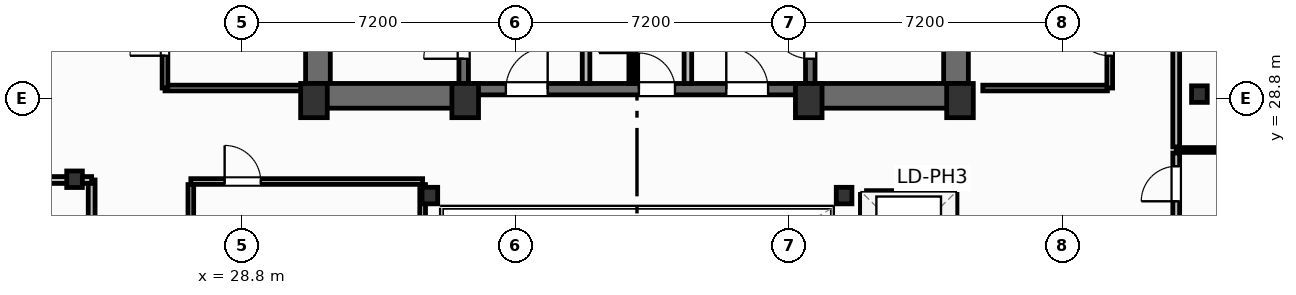
"""IFC4 building model, lengths in metres.
Left out: names, types, materials, properties, quantities, classifications, styles, units other than length and angle.
Written with IfcOpenShell. Run it as: python <this file> out.ifc"""

import sys

from ifc_helpers import new_model, si_unit, direction, frame, frame_2d, origin, origin_2d, place, context, subcontext, project, spatial, rectangle, i_section, extrude, element, fill, save


model = new_model("IFC4")
c1 = context("Model", 3, precision=1e-05, world=origin(), true_north=direction((0.0, 1.0)))
c2 = subcontext(c1, "Body", "Model", "MODEL_VIEW")
j1 = project(units=[si_unit("LENGTHUNIT", "METRE"), si_unit("PLANEANGLEUNIT", "RADIAN")], contexts=[c1])
p1 = place(None, origin())
s1 = spatial("IfcSite", under=j1, at=p1, CompositionType="ELEMENT")
p2 = place(p1, origin())
s2 = spatial("IfcBuilding", under=s1, at=p2, CompositionType="ELEMENT")
p3 = place(p2, frame((0.0, 0.0, 223.8)))
s3 = spatial("IfcBuildingStorey", under=s2, at=p3, CompositionType="ELEMENT", Elevation=223.8)
for number, where, z_axis, x_axis in (
    (1, (30.7, 28.75, 0.0), (0.0, 0.0, 1.0), (1.0, 0.0, 0.0)),
    (2, (34.68, 28.75, 0.0), (0.0, 0.0, 1.0), (1.0, 0.0, 0.0)),
    (3, (43.72, 28.75, 0.0), (0.0, 0.0, 1.0), (1.0, 0.0, 0.0)),
    (4, (47.7, 28.75, 0.0), (0.0, 0.0, 1.0), (1.0, 0.0, 0.0)),
):
    element("IfcColumn", number, at=place(p3, frame(where, z_axis=z_axis, x_axis=x_axis)), inside=s3, PredefinedType="COLUMN", context=c2, shape_type="SweptSolid", body=[
        extrude(rectangle(XDim=0.7, YDim=0.9, at=origin_2d()), origin(), (0.0, 0.0, 1.0), 3.7),
    ])
for number, where, z_axis, x_axis in (
    (5, (33.75, 26.25, 0.0), (0.0, 0.0, 1.0), (1.0, 0.0, 0.0)),
    (6, (44.65, 26.25, 0.0), (0.0, 0.0, 1.0), (1.0, 0.0, 0.0)),
    (7, (24.4, 26.68, 0.0), (0.0, 0.0, 1.0), (1.0, 0.0, 0.0)),
    (8, (54.0, 28.92, 0.0), (0.0, 0.0, 1.0), (1.0, 0.0, 0.0)),
):
    element("IfcColumn", number, at=place(p3, frame(where, z_axis=z_axis, x_axis=x_axis)), inside=s3, PredefinedType="COLUMN", context=c2, shape_type="SweptSolid", body=[
        extrude(i_section(OverallWidth=0.412, OverallDepth=0.435, WebThickness=0.036, FlangeThickness=0.057, FilletRadius=0.025, at=origin_2d()), origin(), (0.0, 0.0, 1.0), 3.7),
    ])
for number, where, z_axis, x_axis in (
    (9, (30.805, 29.2, 0.0), (0.0, 0.0, 1.0), (0.0, 1.0, 0.0)),
    (10, (47.595, 29.2, 0.0), (0.0, 0.0, 1.0), (0.0, 1.0, 0.0)),
):
    element("IfcWall", number, at=place(p3, frame(where, z_axis=z_axis, x_axis=x_axis)), inside=s3, PredefinedType="SHEAR", context=c2, shape_type="SweptSolid", body=[
        extrude(rectangle(XDim=9.22, YDim=0.65, at=frame_2d((4.61, 0.0))), origin(), (0.0, 0.0, 1.0), 3.45),
    ])
p4 = place(p3, frame((30.48, 28.875, 0.0), z_axis=(0.0, 0.0, 1.0), x_axis=(1.0, 0.0, 0.0)))
e11 = element("IfcWall", 11, at=p4, inside=s3, PredefinedType="SHEAR", context=c2, shape_type="SweptSolid", body=[
    extrude(rectangle(XDim=4.32, YDim=0.65, at=frame_2d((2.16, 0.0))), origin(), (0.0, 0.0, 1.0), 3.45),
])
p5 = place(p3, frame((43.6, 28.875, 0.0), z_axis=(0.0, 0.0, 1.0), x_axis=(1.0, 0.0, 0.0)))
e12 = element("IfcWall", 12, at=p5, inside=s3, PredefinedType="SHEAR", context=c2, shape_type="SweptSolid", body=[
    extrude(rectangle(XDim=4.32, YDim=0.65, at=frame_2d((2.16, 0.0))), origin(), (0.0, 0.0, 1.0), 3.45),
])
p6 = place(p3, frame((34.8, 29.05, 0.0), z_axis=(0.0, 0.0, 1.0), x_axis=(1.0, 0.0, 0.0)))
e13 = element("IfcWall", 13, at=p6, inside=s3, PredefinedType="SHEAR", context=c2, shape_type="SweptSolid", body=[
    extrude(rectangle(XDim=8.8, YDim=0.3, at=frame_2d((4.4, 0.0))), origin(), (0.0, 0.0, 1.0), 3.45),
])
p7 = place(p6, frame((0.95, 0.0, 0.0)))
e14 = element("IfcOpeningElement", 14, at=p7, cuts=e13, PredefinedType="OPENING", context=c2, shape_type="SweptSolid", body=[
    extrude(rectangle(XDim=1.1, YDim=2.15, at=frame_2d((0.55, 1.075))), frame((0.0, 0.16, 0.0), z_axis=(0.0, -1.0, 0.0), x_axis=(1.0, 0.0, 0.0)), (0.0, 0.0, 1.0), 0.32),
])
p8 = place(p6, frame((6.75, 0.0, 0.0)))
e15 = element("IfcOpeningElement", 15, at=p8, cuts=e13, PredefinedType="OPENING", context=c2, shape_type="SweptSolid", body=[
    extrude(rectangle(XDim=1.1, YDim=2.15, at=frame_2d((0.55, 1.075))), frame((0.0, 0.16, 0.0), z_axis=(0.0, -1.0, 0.0), x_axis=(1.0, 0.0, 0.0)), (0.0, 0.0, 1.0), 0.32),
])
p9 = place(p6, frame((4.45, 0.0, 0.0)))
e16 = element("IfcOpeningElement", 16, at=p9, cuts=e13, PredefinedType="OPENING", context=c2, shape_type="SweptSolid", body=[
    extrude(rectangle(XDim=0.95, YDim=2.15, at=frame_2d((0.475, 1.075))), frame((0.0, 0.16, 0.0), z_axis=(0.0, -1.0, 0.0), x_axis=(1.0, 0.0, 0.0)), (0.0, 0.0, 1.0), 0.32),
])
p10 = place(p3, frame((34.64, 29.2, 0.0), z_axis=(0.0, 0.0, 1.0), x_axis=(0.0, 1.0, 0.0)))
e17 = element("IfcWall", 17, at=p10, inside=s3, PredefinedType="SHEAR", context=c2, shape_type="SweptSolid", body=[
    extrude(rectangle(XDim=9.22, YDim=0.25, at=frame_2d((4.61, 0.0))), origin(), (0.0, 0.0, 1.0), 3.45),
])
p11 = place(p10, frame((0.65, 0.0, 0.0)))
e18 = element("IfcOpeningElement", 18, at=p11, cuts=e17, PredefinedType="OPENING", context=c2, shape_type="SweptSolid", body=[
    extrude(rectangle(XDim=1.05, YDim=2.15, at=frame_2d((0.525, 1.075))), frame((0.0, 0.135, 0.0), z_axis=(0.0, -1.0, 0.0), x_axis=(1.0, 0.0, 0.0)), (0.0, 0.0, 1.0), 0.27),
])
p12 = place(p3, frame((43.76, 29.2, 0.0), z_axis=(0.0, 0.0, 1.0), x_axis=(0.0, 1.0, 0.0)))
e19 = element("IfcWall", 19, at=p12, inside=s3, PredefinedType="SHEAR", context=c2, shape_type="SweptSolid", body=[
    extrude(rectangle(XDim=9.22, YDim=0.25, at=frame_2d((4.61, 0.0))), origin(), (0.0, 0.0, 1.0), 3.45),
])
p13 = place(p12, frame((0.65, 0.0, 0.0)))
e20 = element("IfcOpeningElement", 20, at=p13, cuts=e19, PredefinedType="OPENING", context=c2, shape_type="SweptSolid", body=[
    extrude(rectangle(XDim=1.05, YDim=2.15, at=frame_2d((0.525, 1.075))), frame((0.0, 0.135, 0.0), z_axis=(0.0, -1.0, 0.0), x_axis=(1.0, 0.0, 0.0)), (0.0, 0.0, 1.0), 0.27),
])
p14 = place(p3, frame((24.85, 19.24, 0.0), z_axis=(0.0, 0.0, 1.0), x_axis=(0.0, 1.0, 0.0)))
e21 = element("IfcWall", 21, at=p14, inside=s3, PredefinedType="PARTITIONING", context=c2, shape_type="SweptSolid", body=[
    extrude(rectangle(XDim=7.42, YDim=0.18, at=frame_2d((3.71, 0.0))), origin(), (0.0, 0.0, 1.0), 3.45),
])
p15 = place(p14, frame((2.4, 0.0, 0.0)))
e22 = element("IfcOpeningElement", 22, at=p15, cuts=e21, PredefinedType="OPENING", context=c2, shape_type="SweptSolid", body=[
    extrude(rectangle(XDim=0.92, YDim=2.05, at=frame_2d((0.46, 1.025))), frame((0.0, 0.1, 0.0), z_axis=(0.0, -1.0, 0.0), x_axis=(1.0, 0.0, 0.0)), (0.0, 0.0, 1.0), 0.2),
])
p16 = place(p3, frame((3.482, 26.66, 0.0), z_axis=(0.0, 0.0, 1.0), x_axis=(1.0, 0.0, 0.0)))
e23 = element("IfcWall", 23, at=p16, inside=s3, PredefinedType="PARTITIONING", context=c2, shape_type="SweptSolid", body=[
    extrude(rectangle(XDim=21.368, YDim=0.18, at=frame_2d((10.684, 0.0))), origin(), (0.0, 0.0, 1.0), 2.662),
])
p17 = place(p3, frame((53.39, 19.3, 0.0), z_axis=(0.0, 0.0, 1.0), x_axis=(0.0, 1.0, 0.0)))
e24 = element("IfcWall", 24, at=p17, inside=s3, PredefinedType="PARTITIONING", context=c2, shape_type="SweptSolid", body=[
    extrude(rectangle(XDim=8.07, YDim=0.18, at=frame_2d((4.035, 0.0))), origin(), (0.0, 0.0, 1.0), 3.45),
])
p18 = place(p17, frame((6.8, 0.0, 0.0)))
e25 = element("IfcOpeningElement", 25, at=p18, cuts=e24, PredefinedType="OPENING", context=c2, shape_type="SweptSolid", body=[
    extrude(rectangle(XDim=0.92, YDim=2.05, at=frame_2d((0.46, 1.025))), frame((0.0, 0.1, 0.0), z_axis=(0.0, -1.0, 0.0), x_axis=(1.0, 0.0, 0.0)), (0.0, 0.0, 1.0), 0.2),
])
p19 = place(p3, frame((53.39, 27.53, 0.0), z_axis=(0.0, 0.0, 1.0), x_axis=(0.0, 1.0, 0.0)))
e26 = element("IfcWall", 26, at=p19, inside=s3, PredefinedType="PARTITIONING", context=c2, shape_type="SweptSolid", body=[
    extrude(rectangle(XDim=11.67, YDim=0.18, at=frame_2d((5.835, 0.0))), origin(), (0.0, 0.0, 1.0), 3.45),
])
p20 = place(p19, frame((5.8, 0.0, 0.0)))
e27 = element("IfcOpeningElement", 27, at=p20, cuts=e26, PredefinedType="OPENING", context=c2, shape_type="SweptSolid", body=[
    extrude(rectangle(XDim=0.92, YDim=2.05, at=frame_2d((0.46, 1.025))), frame((0.0, 0.1, 0.0), z_axis=(0.0, -1.0, 0.0), x_axis=(1.0, 0.0, 0.0)), (0.0, 0.0, 1.0), 0.2),
])
p21 = place(p3, frame((53.39, 27.45, 0.0), z_axis=(0.0, 0.0, 1.0), x_axis=(1.0, 0.0, 0.0)))
e28 = element("IfcWall", 28, at=p21, inside=s3, PredefinedType="PARTITIONING", context=c2, shape_type="SweptSolid", body=[
    extrude(rectangle(XDim=20.199, YDim=0.125, at=frame_2d((10.1, 0.0))), origin(), (0.0, 0.0, 1.0), 2.739),
])
for number, where, z_axis, x_axis in (
    (29, (37.86, 29.2, 0.0), (0.0, 0.0, 1.0), (0.0, 1.0, 0.0)),
    (30, (40.54, 29.2, 0.0), (0.0, 0.0, 1.0), (0.0, 1.0, 0.0)),
):
    element("IfcWall", number, at=place(p3, frame(where, z_axis=z_axis, x_axis=x_axis)), inside=s3, PredefinedType="PARTITIONING", context=c2, shape_type="SweptSolid", body=[
        extrude(rectangle(XDim=5.18, YDim=0.2, at=frame_2d((2.59, 0.0))), origin(), (0.0, 0.0, 1.0), 3.45),
    ])
p22 = place(p3, frame((39.05, 29.2, 0.0), z_axis=(0.0, 0.0, 1.0), x_axis=(0.0, 1.0, 0.0)))
e31 = element("IfcWall", 31, at=p22, inside=s3, PredefinedType="PARTITIONING", context=c2, shape_type="SweptSolid", body=[
    extrude(rectangle(XDim=5.22, YDim=0.125, at=frame_2d((2.61, 0.0))), origin(), (0.0, 0.0, 1.0), 3.45),
])
p23 = place(p22, frame((0.8, 0.0, 0.0)))
e32 = element("IfcOpeningElement", 32, at=p23, cuts=e31, PredefinedType="OPENING", context=c2, shape_type="SweptSolid", body=[
    extrude(rectangle(XDim=0.85, YDim=2.05, at=frame_2d((0.425, 1.025))), frame((0.0, 0.073, 0.0), z_axis=(0.0, -1.0, 0.0), x_axis=(1.0, 0.0, 0.0)), (0.0, 0.0, 1.0), 0.145),
])
p24 = place(p22, frame((3.4, 0.0, 0.0)))
e33 = element("IfcOpeningElement", 33, at=p24, cuts=e31, PredefinedType="OPENING", context=c2, shape_type="SweptSolid", body=[
    extrude(rectangle(XDim=0.85, YDim=2.05, at=frame_2d((0.425, 1.025))), frame((0.0, 0.073, 0.0), z_axis=(0.0, -1.0, 0.0), x_axis=(1.0, 0.0, 0.0)), (0.0, 0.0, 1.0), 0.145),
])
p25 = place(p3, frame((27.46, 26.62, 0.0), z_axis=(0.0, 0.0, 1.0), x_axis=(1.0, 0.0, 0.0)))
e34 = element("IfcWall", 34, at=p25, inside=s3, PredefinedType="PARTITIONING", context=c2, shape_type="SweptSolid", body=[
    extrude(rectangle(XDim=6.1, YDim=0.15, at=frame_2d((3.05, 0.0))), origin(), (0.0, 0.0, 1.0), 2.662),
])
p26 = place(p25, frame((0.89, 0.0, 0.0)))
e35 = element("IfcOpeningElement", 35, at=p26, cuts=e34, PredefinedType="OPENING", context=c2, shape_type="SweptSolid", body=[
    extrude(rectangle(XDim=0.95, YDim=2.05, at=frame_2d((0.475, 1.025))), frame((0.0, 0.085, 0.0), z_axis=(0.0, -1.0, 0.0), x_axis=(1.0, 0.0, 0.0)), (0.0, 0.0, 1.0), 0.17),
])
p27 = place(p3, frame((27.46, 19.38, 0.0), z_axis=(0.0, 0.0, 1.0), x_axis=(0.0, 1.0, 0.0)))
e36 = element("IfcWall", 36, at=p27, inside=s3, PredefinedType="PARTITIONING", context=c2, shape_type="SweptSolid", body=[
    extrude(rectangle(XDim=7.16, YDim=0.15, at=frame_2d((3.58, 0.0))), origin(), (0.0, 0.0, 1.0), 3.45),
])
p28 = place(p27, frame((1.1, 0.0, 0.0)))
e37 = element("IfcOpeningElement", 37, at=p28, cuts=e36, PredefinedType="OPENING", context=c2, shape_type="SweptSolid", body=[
    extrude(rectangle(XDim=0.9, YDim=2.05, at=frame_2d((0.45, 1.025))), frame((0.0, 0.085, 0.0), z_axis=(0.0, -1.0, 0.0), x_axis=(1.0, 0.0, 0.0)), (0.0, 0.0, 1.0), 0.17),
])
p29 = place(p3, frame((33.56, 19.38, 0.0), z_axis=(0.0, 0.0, 1.0), x_axis=(0.0, 1.0, 0.0)))
e38 = element("IfcWall", 38, at=p29, inside=s3, PredefinedType="PARTITIONING", context=c2, shape_type="SweptSolid", body=[
    extrude(rectangle(XDim=7.16, YDim=0.15, at=frame_2d((3.58, 0.0))), origin(), (0.0, 0.0, 1.0), 2.824),
])
p30 = place(p3, frame((26.78, 29.08, 0.0), z_axis=(0.0, 0.0, 1.0), x_axis=(1.0, 0.0, 0.0)))
e39 = element("IfcWall", 39, at=p30, inside=s3, PredefinedType="PARTITIONING", context=c2, shape_type="SweptSolid", body=[
    extrude(rectangle(XDim=3.7, YDim=0.15, at=frame_2d((1.85, 0.0))), origin(), (0.0, 0.0, 1.0), 3.45),
])
p31 = place(p3, frame((26.78, 29.08, 0.0), z_axis=(0.0, 0.0, 1.0), x_axis=(0.0, 1.0, 0.0)))
e40 = element("IfcWall", 40, at=p31, inside=s3, PredefinedType="PARTITIONING", context=c2, shape_type="SweptSolid", body=[
    extrude(rectangle(XDim=5.87, YDim=0.15, at=frame_2d((2.935, 0.0))), origin(), (0.0, 0.0, 1.0), 3.45),
])
p32 = place(p31, frame((0.85, 0.0, 0.0)))
e41 = element("IfcOpeningElement", 41, at=p32, cuts=e40, PredefinedType="OPENING", context=c2, shape_type="SweptSolid", body=[
    extrude(rectangle(XDim=0.92, YDim=2.05, at=frame_2d((0.46, 1.025))), frame((0.0, 0.085, 0.0), z_axis=(0.0, -1.0, 0.0), x_axis=(1.0, 0.0, 0.0)), (0.0, 0.0, 1.0), 0.17),
])
p33 = place(p31, frame((3.45, 0.0, 0.0)))
e42 = element("IfcOpeningElement", 42, at=p33, cuts=e40, PredefinedType="OPENING", context=c2, shape_type="SweptSolid", body=[
    extrude(rectangle(XDim=0.85, YDim=2.05, at=frame_2d((0.425, 1.025))), frame((0.0, 0.085, 0.0), z_axis=(0.0, -1.0, 0.0), x_axis=(1.0, 0.0, 0.0)), (0.0, 0.0, 1.0), 0.17),
])
p34 = place(p3, frame((48.3, 29.08, 0.0), z_axis=(0.0, 0.0, 1.0), x_axis=(1.0, 0.0, 0.0)))
e43 = element("IfcWall", 43, at=p34, inside=s3, PredefinedType="PARTITIONING", context=c2, shape_type="SweptSolid", body=[
    extrude(rectangle(XDim=3.28, YDim=0.15, at=frame_2d((1.64, 0.0))), origin(), (0.0, 0.0, 1.0), 2.662),
])
p35 = place(p3, frame((51.64, 29.08, 0.0), z_axis=(0.0, 0.0, 1.0), x_axis=(0.0, 1.0, 0.0)))
e44 = element("IfcWall", 44, at=p35, inside=s3, PredefinedType="PARTITIONING", context=c2, shape_type="SweptSolid", body=[
    extrude(rectangle(XDim=6.88, YDim=0.15, at=frame_2d((3.44, 0.0))), origin(), (0.0, 0.0, 1.0), 3.45),
])
p36 = place(p35, frame((0.85, 0.0, 0.0)))
e45 = element("IfcOpeningElement", 45, at=p36, cuts=e44, PredefinedType="OPENING", context=c2, shape_type="SweptSolid", body=[
    extrude(rectangle(XDim=0.95, YDim=2.05, at=frame_2d((0.475, 1.025))), frame((0.0, 0.085, 0.0), z_axis=(0.0, -1.0, 0.0), x_axis=(1.0, 0.0, 0.0)), (0.0, 0.0, 1.0), 0.17),
])
p37 = place(p3, frame((45.24, 26.28, 0.0), z_axis=(0.0, 0.0, 1.0), x_axis=(1.0, 0.0, 0.0)))
e46 = element("IfcWall", 46, at=p37, inside=s3, PredefinedType="PARTITIONING", context=c2, shape_type="SweptSolid", body=[
    extrude(rectangle(XDim=2.22, YDim=0.2, at=frame_2d((1.11, 0.0))), origin(), (0.0, 0.0, 1.0), 3.45),
])
p38 = place(p3, frame((45.18, 19.38, 0.0), z_axis=(0.0, 0.0, 1.0), x_axis=(0.0, 1.0, 0.0)))
e47 = element("IfcWall", 47, at=p38, inside=s3, PredefinedType="PARTITIONING", context=c2, shape_type="SweptSolid", body=[
    extrude(rectangle(XDim=6.9, YDim=0.2, at=frame_2d((3.45, 0.0))), origin(), (0.0, 0.0, 1.0), 3.45),
])
p39 = place(p3, frame((47.52, 19.38, 0.0), z_axis=(0.0, 0.0, 1.0), x_axis=(0.0, 1.0, 0.0)))
e48 = element("IfcWall", 48, at=p39, inside=s3, PredefinedType="PARTITIONING", context=c2, shape_type="SweptSolid", body=[
    extrude(rectangle(XDim=6.9, YDim=0.2, at=frame_2d((3.45, 0.0))), origin(), (0.0, 0.0, 1.0), 3.45),
])
p40 = place(p39, frame((0.59, 0.0, 0.0)))
e49 = element("IfcOpeningElement", 49, at=p40, cuts=e48, PredefinedType="OPENING", context=c2, shape_type="SweptSolid", body=[
    extrude(rectangle(XDim=1.1, YDim=2.15, at=frame_2d((0.55, 1.075))), frame((0.0, 0.11, 0.0), z_axis=(0.0, -1.0, 0.0), x_axis=(1.0, 0.0, 0.0)), (0.0, 0.0, 1.0), 0.22),
])
p41 = place(p39, frame((2.89, 0.0, 0.0)))
e50 = element("IfcOpeningElement", 50, at=p41, cuts=e48, PredefinedType="OPENING", context=c2, shape_type="SweptSolid", body=[
    extrude(rectangle(XDim=1.1, YDim=2.15, at=frame_2d((0.55, 1.075))), frame((0.0, 0.11, 0.0), z_axis=(0.0, -1.0, 0.0), x_axis=(1.0, 0.0, 0.0)), (0.0, 0.0, 1.0), 0.22),
])
p42 = place(p39, frame((5.19, 0.0, 0.0)))
e51 = element("IfcOpeningElement", 51, at=p42, cuts=e48, PredefinedType="OPENING", context=c2, shape_type="SweptSolid", body=[
    extrude(rectangle(XDim=1.1, YDim=2.15, at=frame_2d((0.55, 1.075))), frame((0.0, 0.11, 0.0), z_axis=(0.0, -1.0, 0.0), x_axis=(1.0, 0.0, 0.0)), (0.0, 0.0, 1.0), 0.22),
])
p43 = place(p18, origin())
e52 = element("IfcDoor", 52, at=p43, inside=s3, OperationType="SINGLE_SWING_LEFT", PredefinedType="DOOR", context=c2, shape_type="SweptSolid", body=[
    extrude(rectangle(XDim=0.92, YDim=2.05, at=frame_2d((0.46, 1.025))), frame((0.0, 0.025, 0.0), z_axis=(0.0, -1.0, 0.0), x_axis=(1.0, 0.0, 0.0)), (0.0, 0.0, 1.0), 0.05),
])
fill(e25, e52)
p44 = place(p11, origin())
e53 = element("IfcDoor", 53, at=p44, inside=s3, OperationType="SINGLE_SWING_LEFT", PredefinedType="DOOR", context=c2, shape_type="SweptSolid", body=[
    extrude(rectangle(XDim=1.05, YDim=2.15, at=frame_2d((0.525, 1.075))), frame((0.0, 0.025, 0.0), z_axis=(0.0, -1.0, 0.0), x_axis=(1.0, 0.0, 0.0)), (0.0, 0.0, 1.0), 0.05),
])
fill(e18, e53)
p45 = place(p13, origin())
e54 = element("IfcDoor", 54, at=p45, inside=s3, OperationType="SINGLE_SWING_RIGHT", PredefinedType="DOOR", context=c2, shape_type="SweptSolid", body=[
    extrude(rectangle(XDim=1.05, YDim=2.15, at=frame_2d((0.525, 1.075))), frame((0.0, 0.025, 0.0), z_axis=(0.0, -1.0, 0.0), x_axis=(1.0, 0.0, 0.0)), (0.0, 0.0, 1.0), 0.05),
])
fill(e20, e54)
p46 = place(p7, origin())
e55 = element("IfcDoor", 55, at=p46, inside=s3, OperationType="SINGLE_SWING_RIGHT", PredefinedType="DOOR", context=c2, shape_type="SweptSolid", body=[
    extrude(rectangle(XDim=1.1, YDim=2.15, at=frame_2d((0.55, 1.075))), frame((0.0, 0.025, 0.0), z_axis=(0.0, -1.0, 0.0), x_axis=(1.0, 0.0, 0.0)), (0.0, 0.0, 1.0), 0.05),
])
fill(e14, e55)
p47 = place(p8, origin())
e56 = element("IfcDoor", 56, at=p47, inside=s3, OperationType="SINGLE_SWING_LEFT", PredefinedType="DOOR", context=c2, shape_type="SweptSolid", body=[
    extrude(rectangle(XDim=1.1, YDim=2.15, at=frame_2d((0.55, 1.075))), frame((0.0, 0.025, 0.0), z_axis=(0.0, -1.0, 0.0), x_axis=(1.0, 0.0, 0.0)), (0.0, 0.0, 1.0), 0.05),
])
fill(e15, e56)
p48 = place(p23, origin())
e57 = element("IfcDoor", 57, at=p48, inside=s3, OperationType="SINGLE_SWING_LEFT", PredefinedType="DOOR", context=c2, shape_type="SweptSolid", body=[
    extrude(rectangle(XDim=0.85, YDim=2.05, at=frame_2d((0.425, 1.025))), frame((0.0, 0.025, 0.0), z_axis=(0.0, -1.0, 0.0), x_axis=(1.0, 0.0, 0.0)), (0.0, 0.0, 1.0), 0.05),
])
fill(e32, e57)
p49 = place(p9, origin())
e58 = element("IfcDoor", 58, at=p49, inside=s3, OperationType="SINGLE_SWING_LEFT", PredefinedType="DOOR", context=c2, shape_type="SweptSolid", body=[
    extrude(rectangle(XDim=0.95, YDim=2.15, at=frame_2d((0.475, 1.075))), frame((0.0, 0.025, 0.0), z_axis=(0.0, -1.0, 0.0), x_axis=(1.0, 0.0, 0.0)), (0.0, 0.0, 1.0), 0.05),
])
fill(e16, e58)
p50 = place(p26, origin())
e59 = element("IfcDoor", 59, at=p50, inside=s3, OperationType="SINGLE_SWING_LEFT", PredefinedType="DOOR", context=c2, shape_type="SweptSolid", body=[
    extrude(rectangle(XDim=0.95, YDim=2.05, at=frame_2d((0.475, 1.025))), frame((0.0, 0.025, 0.0), z_axis=(0.0, -1.0, 0.0), x_axis=(1.0, 0.0, 0.0)), (0.0, 0.0, 1.0), 0.05),
])
fill(e35, e59)
p51 = place(p32, origin())
e60 = element("IfcDoor", 60, at=p51, inside=s3, OperationType="SINGLE_SWING_LEFT", PredefinedType="DOOR", context=c2, shape_type="SweptSolid", body=[
    extrude(rectangle(XDim=0.92, YDim=2.05, at=frame_2d((0.46, 1.025))), frame((0.0, 0.025, 0.0), z_axis=(0.0, -1.0, 0.0), x_axis=(1.0, 0.0, 0.0)), (0.0, 0.0, 1.0), 0.05),
])
fill(e41, e60)
p52 = place(p36, origin())
e61 = element("IfcDoor", 61, at=p52, inside=s3, OperationType="SINGLE_SWING_RIGHT", PredefinedType="DOOR", context=c2, shape_type="SweptSolid", body=[
    extrude(rectangle(XDim=0.95, YDim=2.05, at=frame_2d((0.475, 1.025))), frame((0.0, 0.025, 0.0), z_axis=(0.0, -1.0, 0.0), x_axis=(1.0, 0.0, 0.0)), (0.0, 0.0, 1.0), 0.05),
])
fill(e45, e61)
save(model, sys.argv[1])
